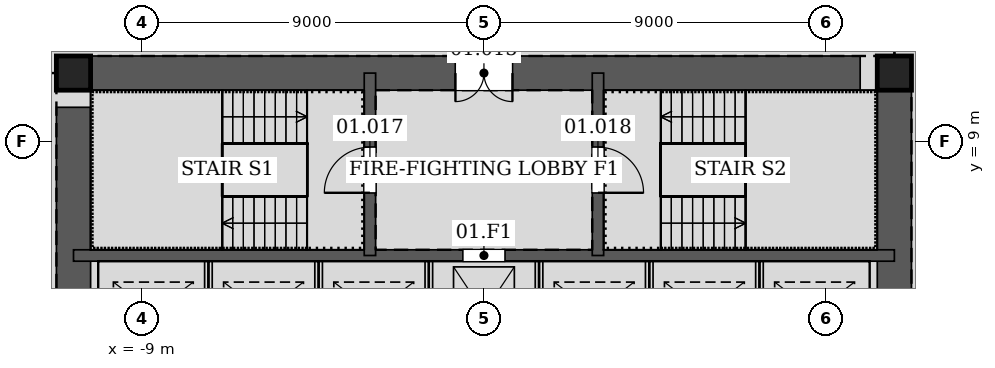
"""IFC4 building model, lengths in metres.
Left out: names, types, materials, properties, quantities, classifications, styles, units other than length and angle.
Written with IfcOpenShell. Run it as: python <this file> out.ifc"""

import sys

from ifc_helpers import new_model, si_unit, direction, frame, frame_2d, origin, origin_2d, place, context, subcontext, project, spatial, rectangle, hollow_rectangle, extrude, element, fill, save


model = new_model("IFC4")
c1 = context("Model", 3, precision=1e-05, world=origin(), true_north=direction((0.0, 1.0)))
c2 = subcontext(c1, "Body", "Model", "MODEL_VIEW")
j1 = project(units=[si_unit("LENGTHUNIT", "METRE"), si_unit("PLANEANGLEUNIT", "RADIAN")], contexts=[c1])
p1 = place(None, origin())
s1 = spatial("IfcSite", under=j1, at=p1, CompositionType="ELEMENT")
p2 = place(p1, origin())
s2 = spatial("IfcBuilding", under=s1, at=p2, CompositionType="ELEMENT")
p3 = place(p2, frame((0.0, 0.0, 7.2)))
s3 = spatial("IfcBuildingStorey", under=s2, at=p3, CompositionType="ELEMENT", Elevation=7.2)
for number, where, z_axis, x_axis in (
    (1, (10.8, 10.8, 0.0), (0.0, 0.0, 1.0), (1.0, 0.0, 0.0)),
    (2, (-10.8, 10.8, 0.0), (0.0, 0.0, 1.0), (1.0, 0.0, 0.0)),
):
    element("IfcColumn", number, at=place(p3, frame(where, z_axis=z_axis, x_axis=x_axis)), inside=s3, PredefinedType="COLUMN", context=c2, shape_type="SweptSolid", body=[
        extrude(hollow_rectangle(XDim=0.9, YDim=0.9, WallThickness=0.06, at=origin_2d()), origin(), (0.0, 0.0, 1.0), 6.0),
    ])
p4 = place(p3, frame((10.8, -10.8, 0.0), z_axis=(0.0, 0.0, 1.0), x_axis=(0.0, 1.0, 0.0)))
e3 = element("IfcWall", 3, at=p4, inside=s3, PredefinedType="SOLIDWALL", context=c2, shape_type="SweptSolid", body=[
    extrude(rectangle(XDim=21.6, YDim=0.9, at=frame_2d((10.8, 0.0))), origin(), (0.0, 0.0, 1.0), 6.0),
])
p5 = place(p4, frame((11.7, 0.0, 0.0)))
e4 = element("IfcOpeningElement", 4, at=p5, cuts=e3, PredefinedType="OPENING", context=c2, shape_type="SweptSolid", body=[
    extrude(rectangle(XDim=1.2, YDim=2.1, at=frame_2d((0.6, 1.05))), frame((0.0, 0.46, 0.0), z_axis=(0.0, -1.0, 0.0), x_axis=(1.0, 0.0, 0.0)), (0.0, 0.0, 1.0), 0.92),
])
p6 = place(p4, frame((8.7, 0.0, 0.0)))
e5 = element("IfcOpeningElement", 5, at=p6, cuts=e3, PredefinedType="OPENING", context=c2, shape_type="SweptSolid", body=[
    extrude(rectangle(XDim=1.2, YDim=2.1, at=frame_2d((0.6, 1.05))), frame((0.0, 0.46, 0.0), z_axis=(0.0, -1.0, 0.0), x_axis=(1.0, 0.0, 0.0)), (0.0, 0.0, 1.0), 0.92),
])
p7 = place(p3, frame((10.8, 10.8, 0.0), z_axis=(0.0, 0.0, 1.0), x_axis=(-1.0, 0.0, 0.0)))
e6 = element("IfcWall", 6, at=p7, inside=s3, PredefinedType="SOLIDWALL", context=c2, shape_type="SweptSolid", body=[
    extrude(rectangle(XDim=21.6, YDim=0.9, at=frame_2d((10.8, 0.0))), origin(), (0.0, 0.0, 1.0), 6.0),
])
p8 = place(p7, frame((10.05, 0.0, 0.0)))
e7 = element("IfcOpeningElement", 7, at=p8, cuts=e6, PredefinedType="OPENING", context=c2, shape_type="SweptSolid", body=[
    extrude(rectangle(XDim=1.5, YDim=2.1, at=frame_2d((0.75, 1.05))), frame((0.0, 0.46, 0.0), z_axis=(0.0, -1.0, 0.0), x_axis=(1.0, 0.0, 0.0)), (0.0, 0.0, 1.0), 0.92),
])
p9 = place(p3, frame((-10.8, 10.8, 0.0), z_axis=(0.0, 0.0, 1.0), x_axis=(0.0, -1.0, 0.0)))
e8 = element("IfcWall", 8, at=p9, inside=s3, PredefinedType="SOLIDWALL", context=c2, shape_type="SweptSolid", body=[
    extrude(rectangle(XDim=21.6, YDim=0.9, at=frame_2d((10.8, 0.0))), origin(), (0.0, 0.0, 1.0), 6.0),
])
p10 = place(p9, frame((8.7, 0.0, 0.0)))
e9 = element("IfcOpeningElement", 9, at=p10, cuts=e8, PredefinedType="OPENING", context=c2, shape_type="SweptSolid", body=[
    extrude(rectangle(XDim=1.2, YDim=2.1, at=frame_2d((0.6, 1.05))), frame((0.0, 0.46, 0.0), z_axis=(0.0, -1.0, 0.0), x_axis=(1.0, 0.0, 0.0)), (0.0, 0.0, 1.0), 0.92),
])
p11 = place(p9, frame((11.7, 0.0, 0.0)))
e10 = element("IfcOpeningElement", 10, at=p11, cuts=e8, PredefinedType="OPENING", context=c2, shape_type="SweptSolid", body=[
    extrude(rectangle(XDim=1.2, YDim=2.1, at=frame_2d((0.6, 1.05))), frame((0.0, 0.46, 0.0), z_axis=(0.0, -1.0, 0.0), x_axis=(1.0, 0.0, 0.0)), (0.0, 0.0, 1.0), 0.92),
])
p12 = place(p3, frame((-10.8, 6.0, 0.0), z_axis=(0.0, 0.0, 1.0), x_axis=(1.0, 0.0, 0.0)))
e11 = element("IfcWall", 11, at=p12, inside=s3, PredefinedType="SOLIDWALL", context=c2, shape_type="SweptSolid", body=[
    extrude(rectangle(XDim=21.6, YDim=0.3, at=frame_2d((10.8, 0.0))), origin(), (0.0, 0.0, 1.0), 6.0),
])
p13 = place(p12, frame((10.25, 0.0, 0.0)))
e12 = element("IfcOpeningElement", 12, at=p13, cuts=e11, PredefinedType="OPENING", context=c2, shape_type="SweptSolid", body=[
    extrude(rectangle(XDim=1.1, YDim=2.1, at=frame_2d((0.55, 1.05))), frame((0.0, 0.16, 0.0), z_axis=(0.0, -1.0, 0.0), x_axis=(1.0, 0.0, 0.0)), (0.0, 0.0, 1.0), 0.32),
])
p14 = place(p3, frame((-3.0, 6.0, 0.0), z_axis=(0.0, 0.0, 1.0), x_axis=(0.0, 1.0, 0.0)))
e13 = element("IfcWall", 13, at=p14, inside=s3, PredefinedType="SOLIDWALL", context=c2, shape_type="SweptSolid", body=[
    extrude(rectangle(XDim=4.8, YDim=0.3, at=frame_2d((2.4, 0.0))), origin(), (0.0, 0.0, 1.0), 6.0),
])
p15 = place(p14, frame((1.65, 0.0, 0.0)))
e14 = element("IfcOpeningElement", 14, at=p15, cuts=e13, PredefinedType="OPENING", context=c2, shape_type="SweptSolid", body=[
    extrude(rectangle(XDim=1.2, YDim=2.1, at=frame_2d((0.6, 1.05))), frame((0.0, 0.16, 0.0), z_axis=(0.0, -1.0, 0.0), x_axis=(1.0, 0.0, 0.0)), (0.0, 0.0, 1.0), 0.32),
])
p16 = place(p3, frame((3.0, 6.0, 0.0), z_axis=(0.0, 0.0, 1.0), x_axis=(0.0, 1.0, 0.0)))
e15 = element("IfcWall", 15, at=p16, inside=s3, PredefinedType="SOLIDWALL", context=c2, shape_type="SweptSolid", body=[
    extrude(rectangle(XDim=4.8, YDim=0.3, at=frame_2d((2.4, 0.0))), origin(), (0.0, 0.0, 1.0), 6.0),
])
p17 = place(p16, frame((1.65, 0.0, 0.0)))
e16 = element("IfcOpeningElement", 16, at=p17, cuts=e15, PredefinedType="OPENING", context=c2, shape_type="SweptSolid", body=[
    extrude(rectangle(XDim=1.2, YDim=2.1, at=frame_2d((0.6, 1.05))), frame((0.0, 0.16, 0.0), z_axis=(0.0, -1.0, 0.0), x_axis=(1.0, 0.0, 0.0)), (0.0, 0.0, 1.0), 0.32),
])
for number, where, z_axis, x_axis in (
    (17, (-7.25, 3.15, 0.0), (0.0, 0.0, 1.0), (0.0, 1.0, 0.0)),
    (18, (-4.35, 3.15, 0.0), (0.0, 0.0, 1.0), (0.0, 1.0, 0.0)),
    (19, (-1.45, 3.15, 0.0), (0.0, 0.0, 1.0), (0.0, 1.0, 0.0)),
    (20, (1.45, 3.15, 0.0), (0.0, 0.0, 1.0), (0.0, 1.0, 0.0)),
    (21, (4.35, 3.15, 0.0), (0.0, 0.0, 1.0), (0.0, 1.0, 0.0)),
    (22, (7.25, 3.15, 0.0), (0.0, 0.0, 1.0), (0.0, 1.0, 0.0)),
):
    element("IfcWall", number, at=place(p3, frame(where, z_axis=z_axis, x_axis=x_axis)), inside=s3, PredefinedType="PARTITIONING", context=c2, shape_type="SweptSolid", body=[
        extrude(rectangle(XDim=2.7, YDim=0.2, at=frame_2d((1.35, 0.0))), origin(), (0.0, 0.0, 1.0), 6.0),
    ])
p18 = place(p8, origin())
e23 = element("IfcDoor", 23, at=p18, inside=s3, OperationType="DOUBLE_DOOR_SINGLE_SWING", PredefinedType="DOOR", context=c2, shape_type="SweptSolid", body=[
    extrude(rectangle(XDim=1.5, YDim=2.1, at=frame_2d((0.75, 1.05))), frame((0.0, 0.025, 0.0), z_axis=(0.0, -1.0, 0.0), x_axis=(1.0, 0.0, 0.0)), (0.0, 0.0, 1.0), 0.05),
])
fill(e7, e23)
p19 = place(p15, origin())
e24 = element("IfcDoor", 24, at=p19, inside=s3, OperationType="SINGLE_SWING_LEFT", PredefinedType="DOOR", context=c2, shape_type="SweptSolid", body=[
    extrude(rectangle(XDim=1.2, YDim=2.1, at=frame_2d((0.6, 1.05))), frame((0.0, 0.025, 0.0), z_axis=(0.0, -1.0, 0.0), x_axis=(1.0, 0.0, 0.0)), (0.0, 0.0, 1.0), 0.05),
])
fill(e14, e24)
p20 = place(p17, frame((1.2, 0.0, 0.0), z_axis=(0.0, 0.0, 1.0), x_axis=(-1.0, 0.0, 0.0)))
e25 = element("IfcDoor", 25, at=p20, inside=s3, OperationType="SINGLE_SWING_RIGHT", PredefinedType="DOOR", context=c2, shape_type="SweptSolid", body=[
    extrude(rectangle(XDim=1.2, YDim=2.1, at=frame_2d((0.6, 1.05))), frame((0.0, 0.025, 0.0), z_axis=(0.0, -1.0, 0.0), x_axis=(1.0, 0.0, 0.0)), (0.0, 0.0, 1.0), 0.05),
])
fill(e16, e25)
p21 = place(p13, origin())
e26 = element("IfcDoor", 26, at=p21, inside=s3, OperationType="DOUBLE_DOOR_SLIDING", PredefinedType="DOOR", context=c2, shape_type="SweptSolid", body=[
    extrude(rectangle(XDim=1.1, YDim=2.1, at=frame_2d((0.55, 1.05))), frame((0.0, 0.025, 0.0), z_axis=(0.0, -1.0, 0.0), x_axis=(1.0, 0.0, 0.0)), (0.0, 0.0, 1.0), 0.05),
])
fill(e12, e26)
save(model, sys.argv[1])
